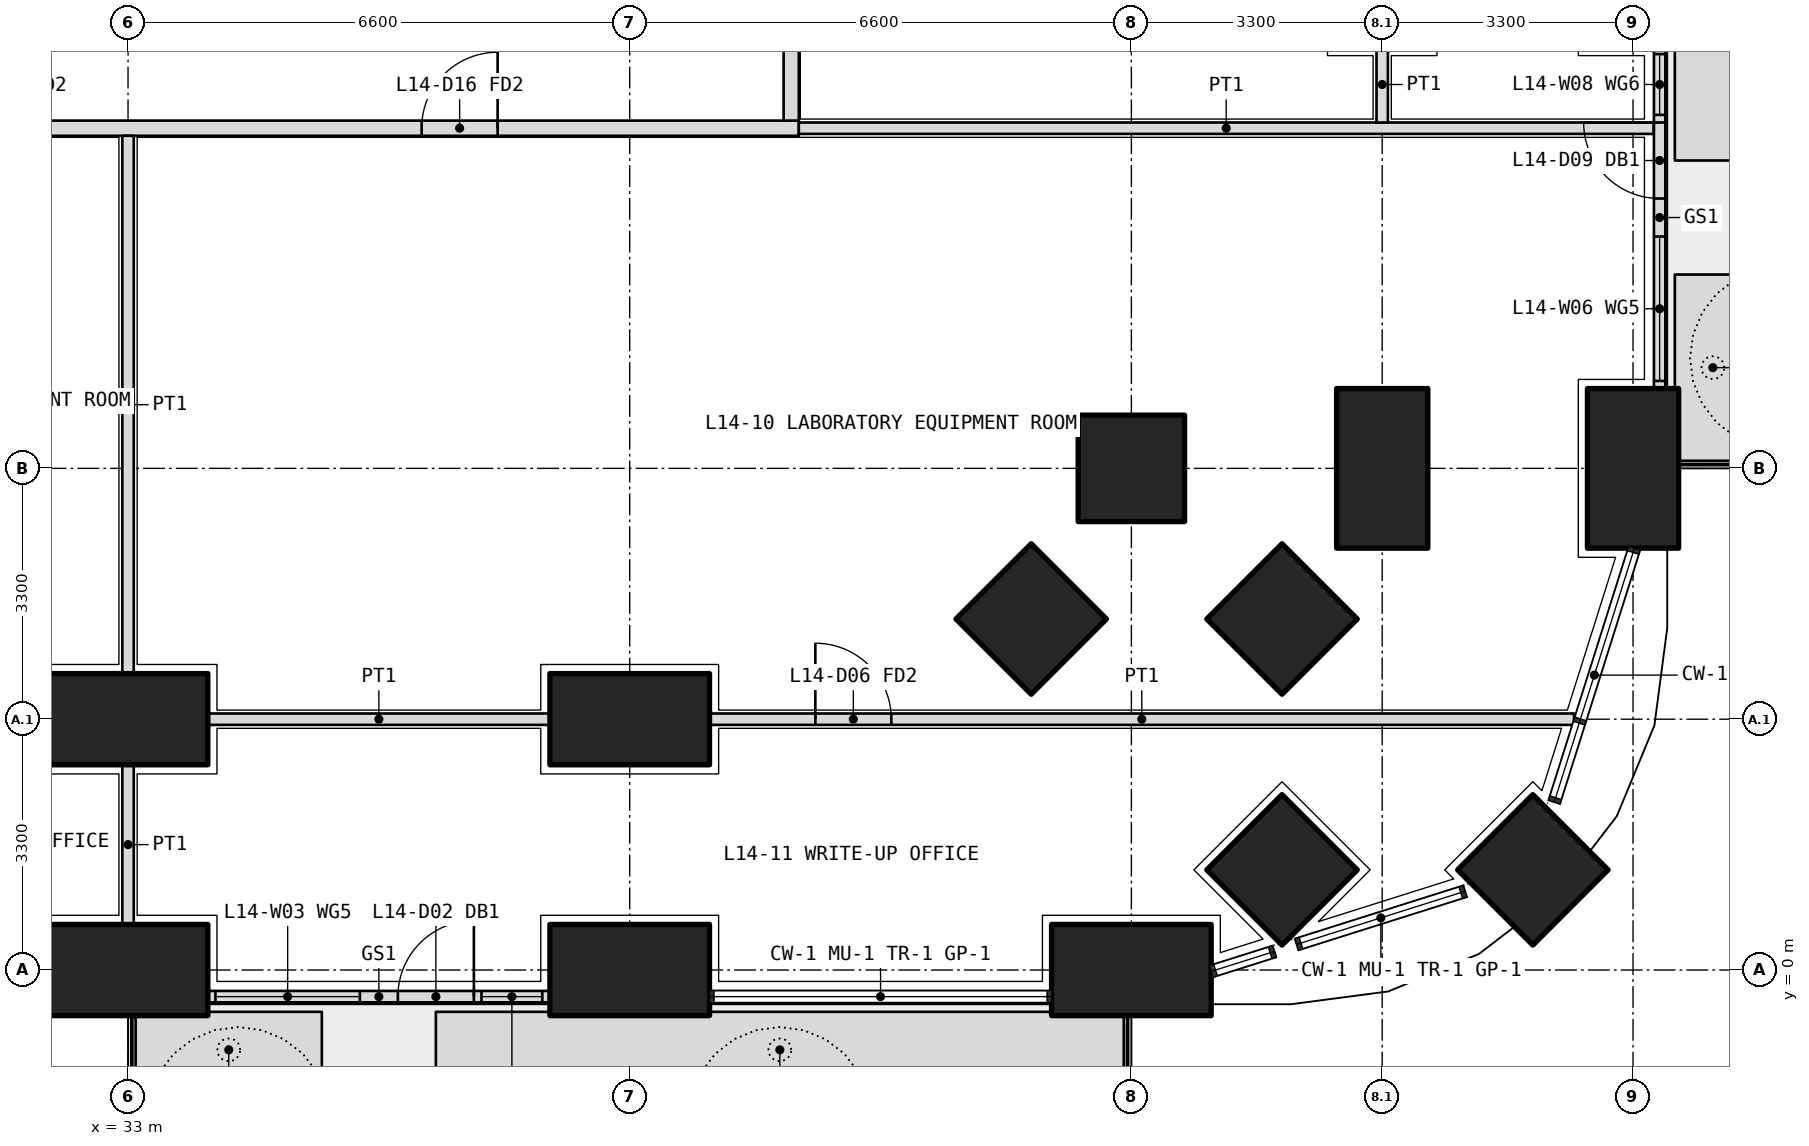
"""IFC4 building model, lengths in metres.
Left out: names, types, materials, properties, quantities, classifications, styles, units other than length and angle.
Written with IfcOpenShell. Run it as: python <this file> out.ifc"""

import sys

from ifc_helpers import new_model, si_unit, direction, frame, frame_2d, origin, origin_2d, place, context, subcontext, project, spatial, polyline, rectangle, outline, extrude, element, fill, save


model = new_model("IFC4")
c1 = context("Model", 3, precision=1e-05, world=origin(), true_north=direction((0.0, 1.0)))
c2 = subcontext(c1, "Body", "Model", "MODEL_VIEW")
j1 = project(units=[si_unit("LENGTHUNIT", "METRE"), si_unit("PLANEANGLEUNIT", "RADIAN")], contexts=[c1])
p1 = place(None, origin())
s1 = spatial("IfcSite", under=j1, at=p1, CompositionType="ELEMENT")
p2 = place(p1, origin())
s2 = spatial("IfcBuilding", under=s1, at=p2, CompositionType="ELEMENT")
p3 = place(p2, frame((0.0, 0.0, 63.3)))
s3 = spatial("IfcBuildingStorey", under=s2, at=p3, CompositionType="ELEMENT", Elevation=63.3)
p4 = place(p3, frame((51.482, 1.318, 0.0), z_axis=(0.0, 0.0, 1.0), x_axis=(0.707106781187, 0.707106781187, 0.0)))
e1 = element("IfcColumn", 1, at=p4, inside=s3, PredefinedType="COLUMN", context=c2, shape_type="SweptSolid", body=[
    extrude(rectangle(XDim=1.4, YDim=1.4, at=origin_2d()), origin(), (0.0, 0.0, 1.0), 4.2),
])
for number, where, z_axis, x_axis in (
    (2, (33.0, 0.0, 0.0), (0.0, 0.0, 1.0), (1.0, 0.0, 0.0)),
    (3, (39.6, 0.0, 0.0), (0.0, 0.0, 1.0), (1.0, 0.0, 0.0)),
    (4, (46.2, 0.0, 0.0), (0.0, 0.0, 1.0), (1.0, 0.0, 0.0)),
    (5, (52.8, 6.6, 0.0), (0.0, 0.0, 1.0), (0.0, 1.0, 0.0)),
):
    element("IfcColumn", number, at=place(p3, frame(where, z_axis=z_axis, x_axis=x_axis)), inside=s3, PredefinedType="COLUMN", context=c2, shape_type="SweptSolid", body=[
        extrude(rectangle(XDim=2.1, YDim=1.2, at=origin_2d()), origin(), (0.0, 0.0, 1.0), 4.2),
    ])
for number, where, z_axis, x_axis in (
    (6, (46.2, 6.6, 0.0), (0.0, 0.0, 1.0), (1.0, 0.0, 0.0)),
    (7, (48.182, 1.318, 0.0), (0.0, 0.0, 1.0), (0.707, 0.707, 0.0)),
):
    element("IfcColumn", number, at=place(p3, frame(where, z_axis=z_axis, x_axis=x_axis)), inside=s3, PredefinedType="COLUMN", context=c2, shape_type="SweptSolid", body=[
        extrude(rectangle(XDim=1.4, YDim=1.4, at=origin_2d()), origin(), (0.0, 0.0, 1.0), 4.2),
    ])
p5 = place(p3, frame((49.5, 6.6, 0.0), z_axis=(0.0, 0.0, 1.0), x_axis=(0.0, 1.0, 0.0)))
e8 = element("IfcColumn", 8, at=p5, inside=s3, PredefinedType="COLUMN", context=c2, shape_type="SweptSolid", body=[
    extrude(rectangle(XDim=2.1, YDim=1.2, at=origin_2d()), origin(), (0.0, 0.0, 1.0), 4.2),
])
p6 = place(p3, frame((48.182, 4.618, 0.0), z_axis=(0.0, 0.0, 1.0), x_axis=(0.707106781187, 0.707106781187, 0.0)))
e9 = element("IfcColumn", 9, at=p6, inside=s3, PredefinedType="COLUMN", context=c2, shape_type="SweptSolid", body=[
    extrude(rectangle(XDim=1.4, YDim=1.4, at=origin_2d()), origin(), (0.0, 0.0, 1.0), 4.2),
])
for number, where, z_axis, x_axis in (
    (10, (33.0, 3.3, 0.0), (0.0, 0.0, 1.0), (1.0, 0.0, 0.0)),
    (11, (39.6, 3.3, 0.0), (0.0, 0.0, 1.0), (1.0, 0.0, 0.0)),
):
    element("IfcColumn", number, at=place(p3, frame(where, z_axis=z_axis, x_axis=x_axis)), inside=s3, PredefinedType="COLUMN", context=c2, shape_type="SweptSolid", body=[
        extrude(rectangle(XDim=2.1, YDim=1.2, at=origin_2d()), origin(), (0.0, 0.0, 1.0), 4.2),
    ])
p7 = place(p3, frame((44.882, 4.618, 0.0), z_axis=(0.0, 0.0, 1.0), x_axis=(0.707106781187, 0.707106781187, 0.0)))
e12 = element("IfcColumn", 12, at=p7, inside=s3, PredefinedType="COLUMN", context=c2, shape_type="SweptSolid", body=[
    extrude(rectangle(XDim=1.4, YDim=1.4, at=origin_2d()), origin(), (0.0, 0.0, 1.0), 4.2),
])
p8 = place(p3, origin())
e13 = element("IfcWall", 13, at=p8, inside=s3, PredefinedType="USERDEFINED", context=c2, shape_type="SweptSolid", body=[
    extrude(outline(polyline([(33.1, -1.55), (35.55, -1.55), (35.55, -0.55), (33.1, -0.55), (33.1, -1.55)]), holes=[polyline([(33.25, -1.4), (35.4, -1.4), (35.4, -0.7), (33.25, -0.7), (33.25, -1.4)])]), origin(), (0.0, 0.0, 1.0), 1.05),
])
p9 = place(p3, origin())
e14 = element("IfcWall", 14, at=p9, inside=s3, PredefinedType="USERDEFINED", context=c2, shape_type="SweptSolid", body=[
    extrude(outline(polyline([(37.05, -1.55), (46.1, -1.55), (46.1, -0.55), (37.05, -0.55), (37.05, -1.55)]), holes=[polyline([(37.2, -1.4), (45.95, -1.4), (45.95, -0.7), (37.2, -0.7), (37.2, -1.4)])]), origin(), (0.0, 0.0, 1.0), 1.05),
])
p10 = place(p3, origin())
e15 = element("IfcWall", 15, at=p10, inside=s3, PredefinedType="USERDEFINED", context=c2, shape_type="SweptSolid", body=[
    extrude(outline(polyline([(53.35, 6.7), (54.35, 6.7), (54.35, 9.15), (53.35, 9.15), (53.35, 6.7)]), holes=[polyline([(53.5, 6.85), (54.2, 6.85), (54.2, 9.0), (53.5, 9.0), (53.5, 6.85)])]), origin(), (0.0, 0.0, 1.0), 1.05),
])
p11 = place(p3, origin())
e16 = element("IfcWall", 16, at=p11, inside=s3, PredefinedType="USERDEFINED", context=c2, shape_type="SweptSolid", body=[
    extrude(outline(polyline([(53.35, 10.65), (54.35, 10.65), (54.35, 19.7), (53.35, 19.7), (53.35, 10.65)]), holes=[polyline([(53.5, 10.8), (54.2, 10.8), (54.2, 19.55), (53.5, 19.55), (53.5, 10.8)])]), origin(), (0.0, 0.0, 1.0), 1.05),
])
p12 = place(p3, frame((34.05, -0.35, 0.0), z_axis=(0.0, 0.0, 1.0), x_axis=(1.0, 0.0, 0.0)))
e17 = element("IfcWall", 17, at=p12, inside=s3, PredefinedType="SOLIDWALL", context=c2, shape_type="SweptSolid", body=[
    extrude(rectangle(XDim=4.5, YDim=0.15, at=frame_2d((2.25, 0.0))), origin(), (0.0, 0.0, 1.0), 2.6),
])
p13 = place(p12, frame((2.5, 0.0, 0.0)))
e18 = element("IfcOpeningElement", 18, at=p13, cuts=e17, PredefinedType="OPENING", context=c2, shape_type="SweptSolid", body=[
    extrude(rectangle(XDim=1.0, YDim=2.4, at=frame_2d((0.5, 1.2))), frame((0.0, 0.085, 0.0), z_axis=(0.0, -1.0, 0.0), x_axis=(1.0, 0.0, 0.0)), (0.0, 0.0, 1.0), 0.17),
])
p14 = place(p12, frame((0.1, 0.0, 0.1)))
e19 = element("IfcOpeningElement", 19, at=p14, cuts=e17, PredefinedType="OPENING", context=c2, shape_type="SweptSolid", body=[
    extrude(rectangle(XDim=1.9, YDim=2.2, at=frame_2d((0.95, 1.1))), frame((0.0, 0.085, 0.0), z_axis=(0.0, -1.0, 0.0), x_axis=(1.0, 0.0, 0.0)), (0.0, 0.0, 1.0), 0.17),
])
p15 = place(p12, frame((3.6, 0.0, 0.1)))
e20 = element("IfcOpeningElement", 20, at=p15, cuts=e17, PredefinedType="OPENING", context=c2, shape_type="SweptSolid", body=[
    extrude(rectangle(XDim=0.8, YDim=2.2, at=frame_2d((0.4, 1.1))), frame((0.0, 0.085, 0.0), z_axis=(0.0, -1.0, 0.0), x_axis=(1.0, 0.0, 0.0)), (0.0, 0.0, 1.0), 0.17),
])
p16 = place(p3, frame((53.15, 7.65, 0.0), z_axis=(0.0, 0.0, 1.0), x_axis=(0.0, 1.0, 0.0)))
e21 = element("IfcWall", 21, at=p16, inside=s3, PredefinedType="SOLIDWALL", context=c2, shape_type="SweptSolid", body=[
    extrude(rectangle(XDim=4.5, YDim=0.15, at=frame_2d((2.25, 0.0))), origin(), (0.0, 0.0, 1.0), 2.6),
])
p17 = place(p16, frame((2.5, 0.0, 0.0)))
e22 = element("IfcOpeningElement", 22, at=p17, cuts=e21, PredefinedType="OPENING", context=c2, shape_type="SweptSolid", body=[
    extrude(rectangle(XDim=1.0, YDim=2.4, at=frame_2d((0.5, 1.2))), frame((0.0, 0.085, 0.0), z_axis=(0.0, -1.0, 0.0), x_axis=(1.0, 0.0, 0.0)), (0.0, 0.0, 1.0), 0.17),
])
p18 = place(p16, frame((0.1, 0.0, 0.1)))
e23 = element("IfcOpeningElement", 23, at=p18, cuts=e21, PredefinedType="OPENING", context=c2, shape_type="SweptSolid", body=[
    extrude(rectangle(XDim=1.9, YDim=2.2, at=frame_2d((0.95, 1.1))), frame((0.0, 0.085, 0.0), z_axis=(0.0, -1.0, 0.0), x_axis=(1.0, 0.0, 0.0)), (0.0, 0.0, 1.0), 0.17),
])
p19 = place(p16, frame((3.6, 0.0, 0.1)))
e24 = element("IfcOpeningElement", 24, at=p19, cuts=e21, PredefinedType="OPENING", context=c2, shape_type="SweptSolid", body=[
    extrude(rectangle(XDim=0.8, YDim=2.2, at=frame_2d((0.4, 1.1))), frame((0.0, 0.085, 0.0), z_axis=(0.0, -1.0, 0.0), x_axis=(1.0, 0.0, 0.0)), (0.0, 0.0, 1.0), 0.17),
])
p20 = place(p3, frame((10.975, 11.075, 0.0), z_axis=(0.0, 0.0, 1.0), x_axis=(1.0, 0.0, 0.0)))
e25 = element("IfcWall", 25, at=p20, inside=s3, PredefinedType="PARTITIONING", context=c2, shape_type="SweptSolid", body=[
    extrude(rectangle(XDim=30.85, YDim=0.2, at=frame_2d((15.425, 0.0))), origin(), (0.0, 0.0, 1.0), 2.85),
])
p21 = place(p20, frame((0.663, 0.0, 0.0)))
e26 = element("IfcOpeningElement", 26, at=p21, cuts=e25, PredefinedType="OPENING", context=c2, shape_type="SweptSolid", body=[
    extrude(rectangle(XDim=1.0, YDim=2.1, at=frame_2d((0.5, 1.05))), frame((0.0, 0.11, 0.0), z_axis=(0.0, -1.0, 0.0), x_axis=(1.0, 0.0, 0.0)), (0.0, 0.0, 1.0), 0.22),
])
p22 = place(p20, frame((3.275, 0.0, 0.0)))
e27 = element("IfcOpeningElement", 27, at=p22, cuts=e25, PredefinedType="OPENING", context=c2, shape_type="SweptSolid", body=[
    extrude(rectangle(XDim=1.2, YDim=2.1, at=frame_2d((0.6, 1.05))), frame((0.0, 0.11, 0.0), z_axis=(0.0, -1.0, 0.0), x_axis=(1.0, 0.0, 0.0)), (0.0, 0.0, 1.0), 0.22),
])
p23 = place(p20, frame((7.125, 0.0, 0.0)))
e28 = element("IfcOpeningElement", 28, at=p23, cuts=e25, PredefinedType="OPENING", context=c2, shape_type="SweptSolid", body=[
    extrude(rectangle(XDim=1.0, YDim=2.1, at=frame_2d((0.5, 1.05))), frame((0.0, 0.11, 0.0), z_axis=(0.0, -1.0, 0.0), x_axis=(1.0, 0.0, 0.0)), (0.0, 0.0, 1.0), 0.22),
])
p24 = place(p20, frame((10.425, 0.0, 0.0)))
e29 = element("IfcOpeningElement", 29, at=p24, cuts=e25, PredefinedType="OPENING", context=c2, shape_type="SweptSolid", body=[
    extrude(rectangle(XDim=1.0, YDim=2.1, at=frame_2d((0.5, 1.05))), frame((0.0, 0.11, 0.0), z_axis=(0.0, -1.0, 0.0), x_axis=(1.0, 0.0, 0.0)), (0.0, 0.0, 1.0), 0.22),
])
p25 = place(p20, frame((14.825, 0.0, 0.0)))
e30 = element("IfcOpeningElement", 30, at=p25, cuts=e25, PredefinedType="OPENING", context=c2, shape_type="SweptSolid", body=[
    extrude(rectangle(XDim=1.2, YDim=2.1, at=frame_2d((0.6, 1.05))), frame((0.0, 0.11, 0.0), z_axis=(0.0, -1.0, 0.0), x_axis=(1.0, 0.0, 0.0)), (0.0, 0.0, 1.0), 0.22),
])
p26 = place(p20, frame((19.875, 0.0, 0.0)))
e31 = element("IfcOpeningElement", 31, at=p26, cuts=e25, PredefinedType="OPENING", context=c2, shape_type="SweptSolid", body=[
    extrude(rectangle(XDim=1.0, YDim=2.1, at=frame_2d((0.5, 1.05))), frame((0.0, 0.11, 0.0), z_axis=(0.0, -1.0, 0.0), x_axis=(1.0, 0.0, 0.0)), (0.0, 0.0, 1.0), 0.22),
])
p27 = place(p20, frame((25.887, 0.0, 0.0)))
e32 = element("IfcOpeningElement", 32, at=p27, cuts=e25, PredefinedType="OPENING", context=c2, shape_type="SweptSolid", body=[
    extrude(rectangle(XDim=1.0, YDim=2.1, at=frame_2d((0.5, 1.05))), frame((0.0, 0.11, 0.0), z_axis=(0.0, -1.0, 0.0), x_axis=(1.0, 0.0, 0.0)), (0.0, 0.0, 1.0), 0.22),
])
p28 = place(p3, frame((41.725, 11.175, 0.0), z_axis=(0.0, 0.0, 1.0), x_axis=(0.0, 1.0, 0.0)))
e33 = element("IfcWall", 33, at=p28, inside=s3, PredefinedType="PARTITIONING", context=c2, shape_type="SweptSolid", body=[
    extrude(rectangle(XDim=5.325, YDim=0.2, at=frame_2d((2.663, 0.0))), origin(), (0.0, 0.0, 1.0), 2.85),
])
p29 = place(p28, frame((2.113, 0.0, 0.0)))
e34 = element("IfcOpeningElement", 34, at=p29, cuts=e33, PredefinedType="OPENING", context=c2, shape_type="SweptSolid", body=[
    extrude(rectangle(XDim=1.0, YDim=2.1, at=frame_2d((0.5, 1.05))), frame((0.0, 0.11, 0.0), z_axis=(0.0, -1.0, 0.0), x_axis=(1.0, 0.0, 0.0)), (0.0, 0.0, 1.0), 0.22),
])
p30 = place(p3, frame((53.07, 11.075, 0.0), z_axis=(0.0, 0.0, 1.0), x_axis=(-1.0, 0.0, 0.0)))
e35 = element("IfcWall", 35, at=p30, inside=s3, PredefinedType="PARTITIONING", context=c2, shape_type="SweptSolid", body=[
    extrude(rectangle(XDim=11.245, YDim=0.15, at=frame_2d((5.623, 0.0))), origin(), (0.0, 0.0, 1.0), 2.6),
])
p31 = place(p3, frame((34.05, 3.3, 0.0), z_axis=(0.0, 0.0, 1.0), x_axis=(1.0, 0.0, 0.0)))
e36 = element("IfcWall", 36, at=p31, inside=s3, PredefinedType="PARTITIONING", context=c2, shape_type="SweptSolid", body=[
    extrude(rectangle(XDim=4.5, YDim=0.15, at=frame_2d((2.25, 0.0))), origin(), (0.0, 0.0, 1.0), 3.9),
])
p32 = place(p3, frame((40.65, 3.3, 0.0), z_axis=(0.0, 0.0, 1.0), x_axis=(1.0, 0.0, 0.0)))
e37 = element("IfcWall", 37, at=p32, inside=s3, PredefinedType="PARTITIONING", context=c2, shape_type="SweptSolid", body=[
    extrude(rectangle(XDim=11.374, YDim=0.15, at=frame_2d((5.687, 0.0))), origin(), (0.0, 0.0, 1.0), 2.6),
])
p33 = place(p32, frame((1.392, 0.0, 0.0)))
e38 = element("IfcOpeningElement", 38, at=p33, cuts=e37, PredefinedType="OPENING", context=c2, shape_type="SweptSolid", body=[
    extrude(rectangle(XDim=1.0, YDim=2.1, at=frame_2d((0.5, 1.05))), frame((0.0, 0.085, 0.0), z_axis=(0.0, -1.0, 0.0), x_axis=(1.0, 0.0, 0.0)), (0.0, 0.0, 1.0), 0.17),
])
p34 = place(p3, frame((33.0, 0.6, 0.0), z_axis=(0.0, 0.0, 1.0), x_axis=(0.0, 1.0, 0.0)))
e39 = element("IfcWall", 39, at=p34, inside=s3, PredefinedType="PARTITIONING", context=c2, shape_type="SweptSolid", body=[
    extrude(rectangle(XDim=2.1, YDim=0.15, at=frame_2d((1.05, 0.0))), origin(), (0.0, 0.0, 1.0), 2.85),
])
p35 = place(p3, frame((33.0, 3.9, 0.0), z_axis=(0.0, 0.0, 1.0), x_axis=(0.0, 1.0, 0.0)))
e40 = element("IfcWall", 40, at=p35, inside=s3, PredefinedType="PARTITIONING", context=c2, shape_type="SweptSolid", body=[
    extrude(rectangle(XDim=7.075, YDim=0.15, at=frame_2d((3.538, 0.0))), origin(), (0.0, 0.0, 1.0), 2.85),
])
p36 = place(p3, frame((49.5, 11.15, 0.0), z_axis=(0.0, 0.0, 1.0), x_axis=(0.0, 1.0, 0.0)))
e41 = element("IfcWall", 41, at=p36, inside=s3, PredefinedType="PARTITIONING", context=c2, shape_type="SweptSolid", body=[
    extrude(rectangle(XDim=1.0, YDim=0.15, at=frame_2d((0.5, 0.0))), origin(), (0.0, 0.0, 1.0), 3.9),
])
p37 = place(p13, origin())
e42 = element("IfcDoor", 42, at=p37, inside=s3, OperationType="SINGLE_SWING_RIGHT", PredefinedType="DOOR", context=c2, shape_type="SweptSolid", body=[
    extrude(rectangle(XDim=1.0, YDim=2.4, at=frame_2d((0.5, 1.2))), frame((0.0, 0.025, 0.0), z_axis=(0.0, -1.0, 0.0), x_axis=(1.0, 0.0, 0.0)), (0.0, 0.0, 1.0), 0.05),
])
fill(e18, e42)
p38 = place(p14, origin())
e43 = element("IfcWindow", 43, at=p38, inside=s3, PartitioningType="SINGLE_PANEL", PredefinedType="WINDOW", context=c2, shape_type="SweptSolid", body=[
    extrude(rectangle(XDim=1.9, YDim=2.2, at=frame_2d((0.95, 1.1))), frame((0.0, 0.03, 0.0), z_axis=(0.0, -1.0, 0.0), x_axis=(1.0, 0.0, 0.0)), (0.0, 0.0, 1.0), 0.06),
])
fill(e19, e43)
p39 = place(p15, origin())
e44 = element("IfcWindow", 44, at=p39, inside=s3, PartitioningType="SINGLE_PANEL", PredefinedType="WINDOW", context=c2, shape_type="SweptSolid", body=[
    extrude(rectangle(XDim=0.8, YDim=2.2, at=frame_2d((0.4, 1.1))), frame((0.0, 0.03, 0.0), z_axis=(0.0, -1.0, 0.0), x_axis=(1.0, 0.0, 0.0)), (0.0, 0.0, 1.0), 0.06),
])
fill(e20, e44)
p40 = place(p17, origin())
e45 = element("IfcDoor", 45, at=p40, inside=s3, OperationType="SINGLE_SWING_RIGHT", PredefinedType="DOOR", context=c2, shape_type="SweptSolid", body=[
    extrude(rectangle(XDim=1.0, YDim=2.4, at=frame_2d((0.5, 1.2))), frame((0.0, 0.025, 0.0), z_axis=(0.0, -1.0, 0.0), x_axis=(1.0, 0.0, 0.0)), (0.0, 0.0, 1.0), 0.05),
])
fill(e22, e45)
p41 = place(p18, origin())
e46 = element("IfcWindow", 46, at=p41, inside=s3, PartitioningType="SINGLE_PANEL", PredefinedType="WINDOW", context=c2, shape_type="SweptSolid", body=[
    extrude(rectangle(XDim=1.9, YDim=2.2, at=frame_2d((0.95, 1.1))), frame((0.0, 0.03, 0.0), z_axis=(0.0, -1.0, 0.0), x_axis=(1.0, 0.0, 0.0)), (0.0, 0.0, 1.0), 0.06),
])
fill(e23, e46)
p42 = place(p19, origin())
e47 = element("IfcWindow", 47, at=p42, inside=s3, PartitioningType="SINGLE_PANEL", PredefinedType="WINDOW", context=c2, shape_type="SweptSolid", body=[
    extrude(rectangle(XDim=0.8, YDim=2.2, at=frame_2d((0.4, 1.1))), frame((0.0, 0.03, 0.0), z_axis=(0.0, -1.0, 0.0), x_axis=(1.0, 0.0, 0.0)), (0.0, 0.0, 1.0), 0.06),
])
fill(e24, e47)
p43 = place(p27, origin())
e48 = element("IfcDoor", 48, at=p43, inside=s3, OperationType="SINGLE_SWING_RIGHT", PredefinedType="DOOR", context=c2, shape_type="SweptSolid", body=[
    extrude(rectangle(XDim=1.0, YDim=2.1, at=frame_2d((0.5, 1.05))), frame((0.0, 0.025, 0.0), z_axis=(0.0, -1.0, 0.0), x_axis=(1.0, 0.0, 0.0)), (0.0, 0.0, 1.0), 0.05),
])
fill(e32, e48)
p44 = place(p33, origin())
e49 = element("IfcDoor", 49, at=p44, inside=s3, OperationType="SINGLE_SWING_LEFT", PredefinedType="DOOR", context=c2, shape_type="SweptSolid", body=[
    extrude(rectangle(XDim=1.0, YDim=2.1, at=frame_2d((0.5, 1.05))), frame((0.0, 0.025, 0.0), z_axis=(0.0, -1.0, 0.0), x_axis=(1.0, 0.0, 0.0)), (0.0, 0.0, 1.0), 0.05),
])
fill(e38, e49)
save(model, sys.argv[1])
